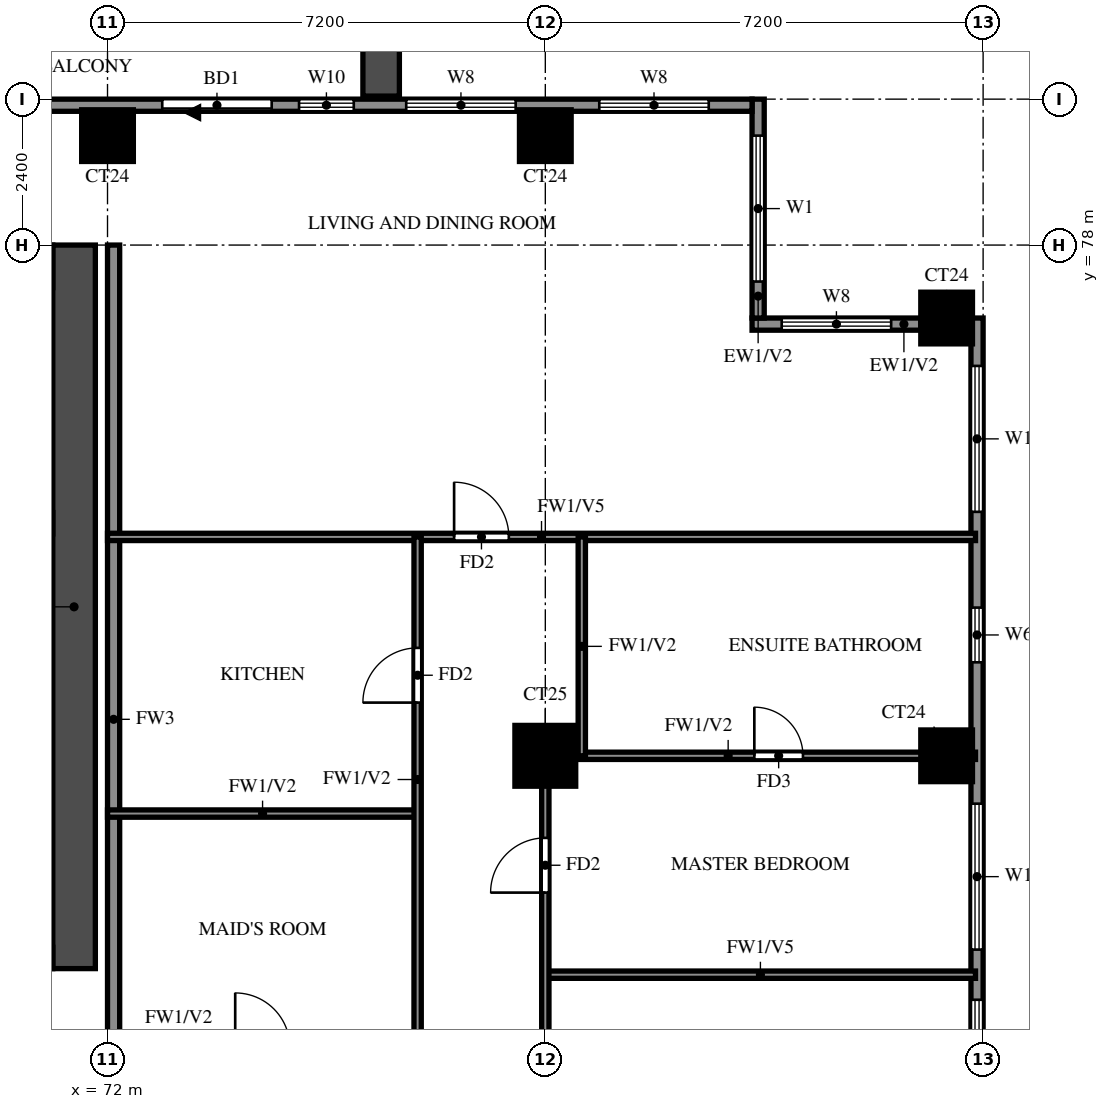
"""IFC4 building model, lengths in metres.
Left out: names, types, materials, properties, quantities, classifications, styles, units other than length and angle.
Written with IfcOpenShell. Run it as: python <this file> out.ifc"""

import sys

from ifc_helpers import new_model, si_unit, direction, frame, frame_2d, origin, origin_2d, place, context, subcontext, project, spatial, rectangle, extrude, source, transform, mapped, element, fill, save


model = new_model("IFC4")
c1 = context("Model", 3, precision=1e-05, world=origin(), true_north=direction((0.0, 1.0)))
c2 = subcontext(c1, "Body", "Model", "MODEL_VIEW")
j1 = project(units=[si_unit("LENGTHUNIT", "METRE"), si_unit("PLANEANGLEUNIT", "RADIAN")], contexts=[c1])
p1 = place(None, origin())
s1 = spatial("IfcSite", under=j1, at=p1, CompositionType="ELEMENT")
p2 = place(p1, origin())
s2 = spatial("IfcBuilding", under=s1, at=p2, CompositionType="ELEMENT")
p3 = place(p2, frame((0.0, 0.0, 164.0)))
s3 = spatial("IfcBuildingStorey", under=s2, at=p3, CompositionType="ELEMENT", Elevation=164.0)
m1 = source(origin(), c2, "Body", "SweptSolid", [
    extrude(rectangle(XDim=1.0, YDim=1.0, at=origin_2d()), origin(), (0.0, 0.0, 1.0), 3.2),
])
p4 = place(p3, frame((79.2, 69.6, 0.0), z_axis=(0.0, 0.0, 1.0), x_axis=(1.0, 0.0, 0.0)))
e1 = element("IfcColumn", 1, at=p4, inside=s3, PredefinedType="COLUMN", context=c2, shape_type="MappedRepresentation", body=[
    mapped(m1, transform((0.0, 0.0, 0.0))),
])
m2 = source(origin(), c2, "Body", "SweptSolid", [
    extrude(rectangle(XDim=0.85, YDim=0.85, at=origin_2d()), origin(), (0.0, 0.0, 1.0), 3.2),
])
for number, where, z_axis, x_axis in (
    (2, (85.8, 69.6, 0.0), (0.0, 0.0, 1.0), (1.0, 0.0, 0.0)),
    (3, (85.8, 76.8, 0.0), (0.0, 0.0, 1.0), (1.0, 0.0, 0.0)),
    (4, (72.0, 79.8, 0.0), (0.0, 0.0, 1.0), (1.0, 0.0, 0.0)),
    (5, (79.2, 79.8, 0.0), (0.0, 0.0, 1.0), (1.0, 0.0, 0.0)),
):
    element("IfcColumn", number, at=place(p3, frame(where, z_axis=z_axis, x_axis=x_axis)), inside=s3, PredefinedType="COLUMN", context=c2, shape_type="MappedRepresentation", body=[
        mapped(m2, transform((0.0, 0.0, 0.0))),
    ])
p5 = place(p3, frame((71.45, 66.1, 0.0), z_axis=(0.0, 0.0, 1.0), x_axis=(0.0, 1.0, 0.0)))
e6 = element("IfcWall", 6, at=p5, inside=s3, PredefinedType="SHEAR", context=c2, shape_type="SweptSolid", body=[
    extrude(rectangle(XDim=11.9, YDim=0.7, at=frame_2d((5.95, 0.0))), origin(), (0.0, 0.0, 1.0), 3.2),
])
p6 = place(p3, frame((29.7, 77.65, 0.0), z_axis=(0.0, 0.0, 1.0), x_axis=(1.0, 0.0, 0.0)))
e7 = element("IfcWall", 7, at=p6, inside=s3, PredefinedType="SHEAR", context=c2, shape_type="SweptSolid", body=[
    extrude(rectangle(XDim=41.4, YDim=0.7, at=frame_2d((20.7, 0.0))), origin(), (0.0, 0.0, 1.0), 3.2),
])
p7 = place(p3, frame((29.7, 66.275, 0.0), z_axis=(0.0, 0.0, 1.0), x_axis=(1.0, 0.0, 0.0)))
e8 = element("IfcWall", 8, at=p7, inside=s3, PredefinedType="SHEAR", context=c2, shape_type="SweptSolid", body=[
    extrude(rectangle(XDim=41.4, YDim=0.35, at=frame_2d((20.7, 0.0))), origin(), (0.0, 0.0, 1.0), 3.2),
])
p8 = place(p7, frame((0.925, 0.0, 0.0)))
e9 = element("IfcOpeningElement", 9, at=p8, cuts=e8, PredefinedType="OPENING", context=c2, shape_type="SweptSolid", body=[
    extrude(rectangle(XDim=1.1, YDim=2.1, at=frame_2d((0.55, 1.05))), frame((0.0, 0.185, 0.0), z_axis=(0.0, -1.0, 0.0), x_axis=(1.0, 0.0, 0.0)), (0.0, 0.0, 1.0), 0.37),
])
p9 = place(p7, frame((3.712, 0.0, 0.0)))
e10 = element("IfcOpeningElement", 10, at=p9, cuts=e8, PredefinedType="OPENING", context=c2, shape_type="SweptSolid", body=[
    extrude(rectangle(XDim=1.8, YDim=2.1, at=frame_2d((0.9, 1.05))), frame((0.0, 0.185, 0.0), z_axis=(0.0, -1.0, 0.0), x_axis=(1.0, 0.0, 0.0)), (0.0, 0.0, 1.0), 0.37),
])
p10 = place(p3, frame((86.3, 48.2, 0.0), z_axis=(0.0, 0.0, 1.0), x_axis=(0.0, 1.0, 0.0)))
e11 = element("IfcWall", 11, at=p10, inside=s3, PredefinedType="SOLIDWALL", context=c2, shape_type="SweptSolid", body=[
    extrude(rectangle(XDim=28.6, YDim=0.2, at=frame_2d((14.3, 0.0))), origin(), (0.0, 0.0, 1.0), 3.2),
])
p11 = place(p10, frame((0.775, 0.0, 0.6)))
e12 = element("IfcOpeningElement", 12, at=p11, cuts=e11, PredefinedType="OPENING", context=c2, shape_type="SweptSolid", body=[
    extrude(rectangle(XDim=2.4, YDim=2.4, at=frame_2d((1.2, 1.2))), frame((0.0, 0.11, 0.0), z_axis=(0.0, -1.0, 0.0), x_axis=(1.0, 0.0, 0.0)), (0.0, 0.0, 1.0), 0.22),
])
p12 = place(p10, frame((3.65, 0.0, 0.6)))
e13 = element("IfcOpeningElement", 13, at=p12, cuts=e11, PredefinedType="OPENING", context=c2, shape_type="SweptSolid", body=[
    extrude(rectangle(XDim=2.4, YDim=2.4, at=frame_2d((1.2, 1.2))), frame((0.0, 0.11, 0.0), z_axis=(0.0, -1.0, 0.0), x_axis=(1.0, 0.0, 0.0)), (0.0, 0.0, 1.0), 0.22),
])
p13 = place(p10, frame((11.012, 0.0, 0.6)))
e14 = element("IfcOpeningElement", 14, at=p13, cuts=e11, PredefinedType="OPENING", context=c2, shape_type="SweptSolid", body=[
    extrude(rectangle(XDim=2.4, YDim=2.4, at=frame_2d((1.2, 1.2))), frame((0.0, 0.11, 0.0), z_axis=(0.0, -1.0, 0.0), x_axis=(1.0, 0.0, 0.0)), (0.0, 0.0, 1.0), 0.22),
])
p14 = place(p10, frame((8.538, 0.0, 1.5)))
e15 = element("IfcOpeningElement", 15, at=p14, cuts=e11, PredefinedType="OPENING", context=c2, shape_type="SweptSolid", body=[
    extrude(rectangle(XDim=0.9, YDim=0.9, at=frame_2d((0.45, 0.45))), frame((0.0, 0.11, 0.0), z_axis=(0.0, -1.0, 0.0), x_axis=(1.0, 0.0, 0.0)), (0.0, 0.0, 1.0), 0.22),
])
p15 = place(p10, frame((14.988, 0.0, 0.6)))
e16 = element("IfcOpeningElement", 16, at=p15, cuts=e11, PredefinedType="OPENING", context=c2, shape_type="SweptSolid", body=[
    extrude(rectangle(XDim=2.4, YDim=2.4, at=frame_2d((1.2, 1.2))), frame((0.0, 0.11, 0.0), z_axis=(0.0, -1.0, 0.0), x_axis=(1.0, 0.0, 0.0)), (0.0, 0.0, 1.0), 0.22),
])
p16 = place(p10, frame((18.212, 0.0, 0.6)))
e17 = element("IfcOpeningElement", 17, at=p16, cuts=e11, PredefinedType="OPENING", context=c2, shape_type="SweptSolid", body=[
    extrude(rectangle(XDim=2.4, YDim=2.4, at=frame_2d((1.2, 1.2))), frame((0.0, 0.11, 0.0), z_axis=(0.0, -1.0, 0.0), x_axis=(1.0, 0.0, 0.0)), (0.0, 0.0, 1.0), 0.22),
])
p17 = place(p10, frame((22.938, 0.0, 1.5)))
e18 = element("IfcOpeningElement", 18, at=p17, cuts=e11, PredefinedType="OPENING", context=c2, shape_type="SweptSolid", body=[
    extrude(rectangle(XDim=0.9, YDim=0.9, at=frame_2d((0.45, 0.45))), frame((0.0, 0.11, 0.0), z_axis=(0.0, -1.0, 0.0), x_axis=(1.0, 0.0, 0.0)), (0.0, 0.0, 1.0), 0.22),
])
p18 = place(p10, frame((25.413, 0.0, 0.6)))
e19 = element("IfcOpeningElement", 19, at=p18, cuts=e11, PredefinedType="OPENING", context=c2, shape_type="SweptSolid", body=[
    extrude(rectangle(XDim=2.4, YDim=2.4, at=frame_2d((1.2, 1.2))), frame((0.0, 0.11, 0.0), z_axis=(0.0, -1.0, 0.0), x_axis=(1.0, 0.0, 0.0)), (0.0, 0.0, 1.0), 0.22),
])
p19 = place(p3, frame((85.375, 76.7, 0.0), z_axis=(0.0, 0.0, 1.0), x_axis=(-1.0, 0.0, 0.0)))
e20 = element("IfcWall", 20, at=p19, inside=s3, PredefinedType="SOLIDWALL", context=c2, shape_type="SweptSolid", body=[
    extrude(rectangle(XDim=2.775, YDim=0.2, at=frame_2d((1.387, 0.0))), origin(), (0.0, 0.0, 1.0), 3.2),
])
p20 = place(p19, frame((0.488, 0.0, 0.6)))
e21 = element("IfcOpeningElement", 21, at=p20, cuts=e20, PredefinedType="OPENING", context=c2, shape_type="SweptSolid", body=[
    extrude(rectangle(XDim=1.8, YDim=2.4, at=frame_2d((0.9, 1.2))), frame((0.0, 0.11, 0.0), z_axis=(0.0, -1.0, 0.0), x_axis=(1.0, 0.0, 0.0)), (0.0, 0.0, 1.0), 0.22),
])
p21 = place(p3, frame((82.7, 76.8, 0.0), z_axis=(0.0, 0.0, 1.0), x_axis=(0.0, 1.0, 0.0)))
e22 = element("IfcWall", 22, at=p21, inside=s3, PredefinedType="SOLIDWALL", context=c2, shape_type="SweptSolid", body=[
    extrude(rectangle(XDim=3.6, YDim=0.2, at=frame_2d((1.8, 0.0))), origin(), (0.0, 0.0, 1.0), 3.2),
])
p22 = place(p21, frame((0.6, 0.0, 0.6)))
e23 = element("IfcOpeningElement", 23, at=p22, cuts=e22, PredefinedType="OPENING", context=c2, shape_type="SweptSolid", body=[
    extrude(rectangle(XDim=2.4, YDim=2.4, at=frame_2d((1.2, 1.2))), frame((0.0, 0.11, 0.0), z_axis=(0.0, -1.0, 0.0), x_axis=(1.0, 0.0, 0.0)), (0.0, 0.0, 1.0), 0.22),
])
p23 = place(p3, frame((82.6, 80.3, 0.0), z_axis=(0.0, 0.0, 1.0), x_axis=(-1.0, 0.0, 0.0)))
e24 = element("IfcWall", 24, at=p23, inside=s3, PredefinedType="SOLIDWALL", context=c2, shape_type="SweptSolid", body=[
    extrude(rectangle(XDim=64.6, YDim=0.2, at=frame_2d((32.3, 0.0))), origin(), (0.0, 0.0, 1.0), 3.2),
])
p24 = place(p23, frame((7.9, 0.0, 0.0)))
e25 = element("IfcOpeningElement", 25, at=p24, cuts=e24, PredefinedType="OPENING", context=c2, shape_type="SweptSolid", body=[
    extrude(rectangle(XDim=1.8, YDim=2.4, at=frame_2d((0.9, 1.2))), frame((0.0, 0.11, 0.0), z_axis=(0.0, -1.0, 0.0), x_axis=(1.0, 0.0, 0.0)), (0.0, 0.0, 1.0), 0.22),
])
p25 = place(p23, frame((54.758, 0.0, 0.6)))
e26 = element("IfcOpeningElement", 26, at=p25, cuts=e24, PredefinedType="OPENING", context=c2, shape_type="SweptSolid", body=[
    extrude(rectangle(XDim=2.4, YDim=2.4, at=frame_2d((1.2, 1.2))), frame((0.0, 0.11, 0.0), z_axis=(0.0, -1.0, 0.0), x_axis=(1.0, 0.0, 0.0)), (0.0, 0.0, 1.0), 0.22),
])
p26 = place(p23, frame((57.642, 0.0, 0.6)))
e27 = element("IfcOpeningElement", 27, at=p26, cuts=e24, PredefinedType="OPENING", context=c2, shape_type="SweptSolid", body=[
    extrude(rectangle(XDim=2.4, YDim=2.4, at=frame_2d((1.2, 1.2))), frame((0.0, 0.11, 0.0), z_axis=(0.0, -1.0, 0.0), x_axis=(1.0, 0.0, 0.0)), (0.0, 0.0, 1.0), 0.22),
])
p27 = place(p23, frame((61.988, 0.0, 0.6)))
e28 = element("IfcOpeningElement", 28, at=p27, cuts=e24, PredefinedType="OPENING", context=c2, shape_type="SweptSolid", body=[
    extrude(rectangle(XDim=1.8, YDim=2.4, at=frame_2d((0.9, 1.2))), frame((0.0, 0.11, 0.0), z_axis=(0.0, -1.0, 0.0), x_axis=(1.0, 0.0, 0.0)), (0.0, 0.0, 1.0), 0.22),
])
p28 = place(p23, frame((0.712, 0.0, 0.6)))
e29 = element("IfcOpeningElement", 29, at=p28, cuts=e24, PredefinedType="OPENING", context=c2, shape_type="SweptSolid", body=[
    extrude(rectangle(XDim=1.8, YDim=2.4, at=frame_2d((0.9, 1.2))), frame((0.0, 0.11, 0.0), z_axis=(0.0, -1.0, 0.0), x_axis=(1.0, 0.0, 0.0)), (0.0, 0.0, 1.0), 0.22),
])
p29 = place(p23, frame((3.887, 0.0, 0.6)))
e30 = element("IfcOpeningElement", 30, at=p29, cuts=e24, PredefinedType="OPENING", context=c2, shape_type="SweptSolid", body=[
    extrude(rectangle(XDim=1.8, YDim=2.4, at=frame_2d((0.9, 1.2))), frame((0.0, 0.11, 0.0), z_axis=(0.0, -1.0, 0.0), x_axis=(1.0, 0.0, 0.0)), (0.0, 0.0, 1.0), 0.22),
])
p30 = place(p23, frame((6.55, 0.0, 0.6)))
e31 = element("IfcOpeningElement", 31, at=p30, cuts=e24, PredefinedType="OPENING", context=c2, shape_type="SweptSolid", body=[
    extrude(rectangle(XDim=0.9, YDim=2.4, at=frame_2d((0.45, 1.2))), frame((0.0, 0.11, 0.0), z_axis=(0.0, -1.0, 0.0), x_axis=(1.0, 0.0, 0.0)), (0.0, 0.0, 1.0), 0.22),
])
p31 = place(p3, frame((76.5, 80.45, 0.0), z_axis=(0.0, 0.0, 1.0), x_axis=(0.0, 1.0, 0.0)))
e32 = element("IfcWall", 32, at=p31, inside=s3, PredefinedType="SOLIDWALL", context=c2, shape_type="SweptSolid", body=[
    extrude(rectangle(XDim=2.65, YDim=0.6, at=frame_2d((1.325, 0.0))), origin(), (0.0, 0.0, 1.0), 2.85),
])
p32 = place(p3, frame((72.1, 62.4, 0.0), z_axis=(0.0, 0.0, 1.0), x_axis=(0.0, 1.0, 0.0)))
e33 = element("IfcWall", 33, at=p32, inside=s3, PredefinedType="SOLIDWALL", context=c2, shape_type="SweptSolid", body=[
    extrude(rectangle(XDim=15.6, YDim=0.2, at=frame_2d((7.8, 0.0))), origin(), (0.0, 0.0, 1.0), 3.2),
])
p33 = place(p3, frame((79.2, 66.0, 0.0), z_axis=(0.0, 0.0, 1.0), x_axis=(1.0, 0.0, 0.0)))
e34 = element("IfcWall", 34, at=p33, inside=s3, PredefinedType="PARTITIONING", context=c2, shape_type="SweptSolid", body=[
    extrude(rectangle(XDim=7.075, YDim=0.12, at=frame_2d((3.538, 0.0))), origin(), (0.0, 0.0, 1.0), 2.3),
])
p34 = place(p3, frame((72.0, 68.65, 0.0), z_axis=(0.0, 0.0, 1.0), x_axis=(1.0, 0.0, 0.0)))
e35 = element("IfcWall", 35, at=p34, inside=s3, PredefinedType="PARTITIONING", context=c2, shape_type="SweptSolid", body=[
    extrude(rectangle(XDim=5.1, YDim=0.12, at=frame_2d((2.55, 0.0))), origin(), (0.0, 0.0, 1.0), 3.2),
])
p35 = place(p3, frame((79.2, 69.6, 0.0), z_axis=(0.0, 0.0, 1.0), x_axis=(1.0, 0.0, 0.0)))
e36 = element("IfcWall", 36, at=p35, inside=s3, PredefinedType="PARTITIONING", context=c2, shape_type="SweptSolid", body=[
    extrude(rectangle(XDim=7.075, YDim=0.12, at=frame_2d((3.538, 0.0))), origin(), (0.0, 0.0, 1.0), 3.2),
])
p36 = place(p35, frame((3.438, 0.0, 0.0)))
e37 = element("IfcOpeningElement", 37, at=p36, cuts=e36, PredefinedType="OPENING", context=c2, shape_type="SweptSolid", body=[
    extrude(rectangle(XDim=0.8, YDim=2.1, at=frame_2d((0.4, 1.05))), frame((0.0, 0.07, 0.0), z_axis=(0.0, -1.0, 0.0), x_axis=(1.0, 0.0, 0.0)), (0.0, 0.0, 1.0), 0.14),
])
p37 = place(p3, frame((72.0, 73.2, 0.0), z_axis=(0.0, 0.0, 1.0), x_axis=(1.0, 0.0, 0.0)))
e38 = element("IfcWall", 38, at=p37, inside=s3, PredefinedType="PARTITIONING", context=c2, shape_type="SweptSolid", body=[
    extrude(rectangle(XDim=14.275, YDim=0.12, at=frame_2d((7.137, 0.0))), origin(), (0.0, 0.0, 1.0), 2.3),
])
p38 = place(p37, frame((5.7, 0.0, 0.0)))
e39 = element("IfcOpeningElement", 39, at=p38, cuts=e38, PredefinedType="OPENING", context=c2, shape_type="SweptSolid", body=[
    extrude(rectangle(XDim=0.9, YDim=2.1, at=frame_2d((0.45, 1.05))), frame((0.0, 0.07, 0.0), z_axis=(0.0, -1.0, 0.0), x_axis=(1.0, 0.0, 0.0)), (0.0, 0.0, 1.0), 0.14),
])
p39 = place(p3, frame((77.1, 64.8, 0.0), z_axis=(0.0, 0.0, 1.0), x_axis=(0.0, 1.0, 0.0)))
e40 = element("IfcWall", 40, at=p39, inside=s3, PredefinedType="PARTITIONING", context=c2, shape_type="SweptSolid", body=[
    extrude(rectangle(XDim=8.4, YDim=0.12, at=frame_2d((4.2, 0.0))), origin(), (0.0, 0.0, 1.0), 3.2),
])
p40 = place(p39, frame((5.675, 0.0, 0.0)))
e41 = element("IfcOpeningElement", 41, at=p40, cuts=e40, PredefinedType="OPENING", context=c2, shape_type="SweptSolid", body=[
    extrude(rectangle(XDim=0.9, YDim=2.1, at=frame_2d((0.45, 1.05))), frame((0.0, 0.07, 0.0), z_axis=(0.0, -1.0, 0.0), x_axis=(1.0, 0.0, 0.0)), (0.0, 0.0, 1.0), 0.14),
])
p41 = place(p3, frame((79.2, 58.8, 0.0), z_axis=(0.0, 0.0, 1.0), x_axis=(0.0, 1.0, 0.0)))
e42 = element("IfcWall", 42, at=p41, inside=s3, PredefinedType="PARTITIONING", context=c2, shape_type="SweptSolid", body=[
    extrude(rectangle(XDim=10.8, YDim=0.12, at=frame_2d((5.4, 0.0))), origin(), (0.0, 0.0, 1.0), 3.2),
])
p42 = place(p41, frame((1.35, 0.0, 0.0)))
e43 = element("IfcOpeningElement", 43, at=p42, cuts=e42, PredefinedType="OPENING", context=c2, shape_type="SweptSolid", body=[
    extrude(rectangle(XDim=0.9, YDim=2.1, at=frame_2d((0.45, 1.05))), frame((0.0, 0.07, 0.0), z_axis=(0.0, -1.0, 0.0), x_axis=(1.0, 0.0, 0.0)), (0.0, 0.0, 1.0), 0.14),
])
p43 = place(p41, frame((4.95, 0.0, 0.0)))
e44 = element("IfcOpeningElement", 44, at=p43, cuts=e42, PredefinedType="OPENING", context=c2, shape_type="SweptSolid", body=[
    extrude(rectangle(XDim=0.9, YDim=2.1, at=frame_2d((0.45, 1.05))), frame((0.0, 0.07, 0.0), z_axis=(0.0, -1.0, 0.0), x_axis=(1.0, 0.0, 0.0)), (0.0, 0.0, 1.0), 0.14),
])
p44 = place(p41, frame((8.55, 0.0, 0.0)))
e45 = element("IfcOpeningElement", 45, at=p44, cuts=e42, PredefinedType="OPENING", context=c2, shape_type="SweptSolid", body=[
    extrude(rectangle(XDim=0.9, YDim=2.1, at=frame_2d((0.45, 1.05))), frame((0.0, 0.07, 0.0), z_axis=(0.0, -1.0, 0.0), x_axis=(1.0, 0.0, 0.0)), (0.0, 0.0, 1.0), 0.14),
])
p45 = place(p3, frame((79.8, 69.6, 0.0), z_axis=(0.0, 0.0, 1.0), x_axis=(0.0, 1.0, 0.0)))
e46 = element("IfcWall", 46, at=p45, inside=s3, PredefinedType="PARTITIONING", context=c2, shape_type="SweptSolid", body=[
    extrude(rectangle(XDim=3.6, YDim=0.12, at=frame_2d((1.8, 0.0))), origin(), (0.0, 0.0, 1.0), 3.2),
])
p46 = place(p15, origin())
e47 = element("IfcWindow", 47, at=p46, inside=s3, PartitioningType="DOUBLE_PANEL_VERTICAL", PredefinedType="WINDOW", context=c2, shape_type="SweptSolid", body=[
    extrude(rectangle(XDim=2.4, YDim=2.4, at=frame_2d((1.2, 1.2))), frame((0.0, 0.03, 0.0), z_axis=(0.0, -1.0, 0.0), x_axis=(1.0, 0.0, 0.0)), (0.0, 0.0, 1.0), 0.06),
])
fill(e16, e47)
p47 = place(p16, origin())
e48 = element("IfcWindow", 48, at=p47, inside=s3, PartitioningType="DOUBLE_PANEL_VERTICAL", PredefinedType="WINDOW", context=c2, shape_type="SweptSolid", body=[
    extrude(rectangle(XDim=2.4, YDim=2.4, at=frame_2d((1.2, 1.2))), frame((0.0, 0.03, 0.0), z_axis=(0.0, -1.0, 0.0), x_axis=(1.0, 0.0, 0.0)), (0.0, 0.0, 1.0), 0.06),
])
fill(e17, e48)
p48 = place(p17, origin())
e49 = element("IfcWindow", 49, at=p48, inside=s3, PartitioningType="SINGLE_PANEL", PredefinedType="WINDOW", context=c2, shape_type="SweptSolid", body=[
    extrude(rectangle(XDim=0.9, YDim=0.9, at=frame_2d((0.45, 0.45))), frame((0.0, 0.03, 0.0), z_axis=(0.0, -1.0, 0.0), x_axis=(1.0, 0.0, 0.0)), (0.0, 0.0, 1.0), 0.06),
])
fill(e18, e49)
p49 = place(p18, origin())
e50 = element("IfcWindow", 50, at=p49, inside=s3, PartitioningType="DOUBLE_PANEL_VERTICAL", PredefinedType="WINDOW", context=c2, shape_type="SweptSolid", body=[
    extrude(rectangle(XDim=2.4, YDim=2.4, at=frame_2d((1.2, 1.2))), frame((0.0, 0.03, 0.0), z_axis=(0.0, -1.0, 0.0), x_axis=(1.0, 0.0, 0.0)), (0.0, 0.0, 1.0), 0.06),
])
fill(e19, e50)
p50 = place(p20, origin())
e51 = element("IfcWindow", 51, at=p50, inside=s3, PartitioningType="DOUBLE_PANEL_VERTICAL", PredefinedType="WINDOW", context=c2, shape_type="SweptSolid", body=[
    extrude(rectangle(XDim=1.8, YDim=2.4, at=frame_2d((0.9, 1.2))), frame((0.0, 0.03, 0.0), z_axis=(0.0, -1.0, 0.0), x_axis=(1.0, 0.0, 0.0)), (0.0, 0.0, 1.0), 0.06),
])
fill(e21, e51)
p51 = place(p22, origin())
e52 = element("IfcWindow", 52, at=p51, inside=s3, PartitioningType="DOUBLE_PANEL_VERTICAL", PredefinedType="WINDOW", context=c2, shape_type="SweptSolid", body=[
    extrude(rectangle(XDim=2.4, YDim=2.4, at=frame_2d((1.2, 1.2))), frame((0.0, 0.03, 0.0), z_axis=(0.0, -1.0, 0.0), x_axis=(1.0, 0.0, 0.0)), (0.0, 0.0, 1.0), 0.06),
])
fill(e23, e52)
p52 = place(p24, origin())
e53 = element("IfcDoor", 53, at=p52, inside=s3, OperationType="DOUBLE_DOOR_SLIDING", PredefinedType="DOOR", context=c2, shape_type="SweptSolid", body=[
    extrude(rectangle(XDim=1.8, YDim=2.4, at=frame_2d((0.9, 1.2))), frame((0.0, 0.025, 0.0), z_axis=(0.0, -1.0, 0.0), x_axis=(1.0, 0.0, 0.0)), (0.0, 0.0, 1.0), 0.05),
])
fill(e25, e53)
p53 = place(p28, origin())
e54 = element("IfcWindow", 54, at=p53, inside=s3, PartitioningType="DOUBLE_PANEL_VERTICAL", PredefinedType="WINDOW", context=c2, shape_type="SweptSolid", body=[
    extrude(rectangle(XDim=1.8, YDim=2.4, at=frame_2d((0.9, 1.2))), frame((0.0, 0.03, 0.0), z_axis=(0.0, -1.0, 0.0), x_axis=(1.0, 0.0, 0.0)), (0.0, 0.0, 1.0), 0.06),
])
fill(e29, e54)
p54 = place(p29, origin())
e55 = element("IfcWindow", 55, at=p54, inside=s3, PartitioningType="DOUBLE_PANEL_VERTICAL", PredefinedType="WINDOW", context=c2, shape_type="SweptSolid", body=[
    extrude(rectangle(XDim=1.8, YDim=2.4, at=frame_2d((0.9, 1.2))), frame((0.0, 0.03, 0.0), z_axis=(0.0, -1.0, 0.0), x_axis=(1.0, 0.0, 0.0)), (0.0, 0.0, 1.0), 0.06),
])
fill(e30, e55)
p55 = place(p30, origin())
e56 = element("IfcWindow", 56, at=p55, inside=s3, PartitioningType="SINGLE_PANEL", PredefinedType="WINDOW", context=c2, shape_type="SweptSolid", body=[
    extrude(rectangle(XDim=0.9, YDim=2.4, at=frame_2d((0.45, 1.2))), frame((0.0, 0.03, 0.0), z_axis=(0.0, -1.0, 0.0), x_axis=(1.0, 0.0, 0.0)), (0.0, 0.0, 1.0), 0.06),
])
fill(e31, e56)
p56 = place(p44, origin())
e57 = element("IfcDoor", 57, at=p56, inside=s3, OperationType="SINGLE_SWING_RIGHT", PredefinedType="DOOR", context=c2, shape_type="SweptSolid", body=[
    extrude(rectangle(XDim=0.9, YDim=2.1, at=frame_2d((0.45, 1.05))), frame((0.0, 0.025, 0.0), z_axis=(0.0, -1.0, 0.0), x_axis=(1.0, 0.0, 0.0)), (0.0, 0.0, 1.0), 0.05),
])
fill(e45, e57)
p57 = place(p36, origin())
e58 = element("IfcDoor", 58, at=p57, inside=s3, OperationType="SINGLE_SWING_LEFT", PredefinedType="DOOR", context=c2, shape_type="SweptSolid", body=[
    extrude(rectangle(XDim=0.8, YDim=2.1, at=frame_2d((0.4, 1.05))), frame((0.0, 0.025, 0.0), z_axis=(0.0, -1.0, 0.0), x_axis=(1.0, 0.0, 0.0)), (0.0, 0.0, 1.0), 0.05),
])
fill(e37, e58)
p58 = place(p38, origin())
e59 = element("IfcDoor", 59, at=p58, inside=s3, OperationType="SINGLE_SWING_LEFT", PredefinedType="DOOR", context=c2, shape_type="SweptSolid", body=[
    extrude(rectangle(XDim=0.9, YDim=2.1, at=frame_2d((0.45, 1.05))), frame((0.0, 0.025, 0.0), z_axis=(0.0, -1.0, 0.0), x_axis=(1.0, 0.0, 0.0)), (0.0, 0.0, 1.0), 0.05),
])
fill(e39, e59)
p59 = place(p40, origin())
e60 = element("IfcDoor", 60, at=p59, inside=s3, OperationType="SINGLE_SWING_LEFT", PredefinedType="DOOR", context=c2, shape_type="SweptSolid", body=[
    extrude(rectangle(XDim=0.9, YDim=2.1, at=frame_2d((0.45, 1.05))), frame((0.0, 0.025, 0.0), z_axis=(0.0, -1.0, 0.0), x_axis=(1.0, 0.0, 0.0)), (0.0, 0.0, 1.0), 0.05),
])
fill(e41, e60)
save(model, sys.argv[1])
